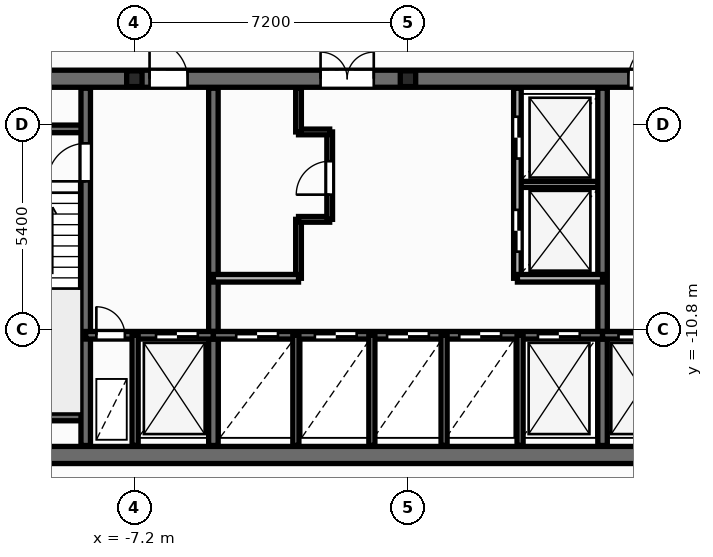
"""IFC4 building model, lengths in metres.
Left out: names, types, materials, properties, quantities, classifications, styles, units other than length and angle.
Written with IfcOpenShell. Run it as: python <this file> out.ifc"""

import sys

from ifc_helpers import new_model, si_unit, direction, frame, frame_2d, origin, origin_2d, place, context, subcontext, project, spatial, rectangle, i_section, extrude, element, fill, save


model = new_model("IFC4")
c1 = context("Model", 3, precision=1e-05, world=origin(), true_north=direction((0.0, 1.0)))
c2 = subcontext(c1, "Body", "Model", "MODEL_VIEW")
j1 = project(units=[si_unit("LENGTHUNIT", "METRE"), si_unit("PLANEANGLEUNIT", "RADIAN")], contexts=[c1])
p1 = place(None, origin())
s1 = spatial("IfcSite", under=j1, at=p1, CompositionType="ELEMENT")
p2 = place(p1, origin())
s2 = spatial("IfcBuilding", under=s1, at=p2, CompositionType="ELEMENT")
p3 = place(p2, frame((0.0, 0.0, 143.7)))
s3 = spatial("IfcBuildingStorey", under=s2, at=p3, CompositionType="ELEMENT", Elevation=143.7)
for number, where, z_axis, x_axis in (
    (1, (-7.2, -4.2, 0.0), (0.0, 0.0, 1.0), (1.0, 0.0, 0.0)),
    (2, (0.0, -4.2, 0.0), (0.0, 0.0, 1.0), (1.0, 0.0, 0.0)),
):
    element("IfcColumn", number, at=place(p3, frame(where, z_axis=z_axis, x_axis=x_axis)), inside=s3, PredefinedType="PILASTER", context=c2, shape_type="SweptSolid", body=[
        extrude(i_section(OverallWidth=0.405, OverallDepth=0.414, WebThickness=0.022, FlangeThickness=0.032, at=origin_2d()), origin(), (0.0, 0.0, 1.0), 3.6),
    ])
p4 = place(p3, frame((-2.88, -9.45, 0.0), z_axis=(0.0, 0.0, 1.0), x_axis=(0.0, 1.0, 0.0)))
e3 = element("IfcWall", 3, at=p4, inside=s3, PredefinedType="PARTITIONING", context=c2, shape_type="SweptSolid", body=[
    extrude(rectangle(XDim=1.55, YDim=0.15, at=frame_2d((0.775, 0.0))), origin(), (0.0, 0.0, 1.0), 3.35),
])
p5 = place(p3, frame((-2.88, -7.9, 0.0), z_axis=(0.0, 0.0, 1.0), x_axis=(1.0, 0.0, 0.0)))
e4 = element("IfcWall", 4, at=p5, inside=s3, PredefinedType="PARTITIONING", context=c2, shape_type="SweptSolid", body=[
    extrude(rectangle(XDim=0.82, YDim=0.15, at=frame_2d((0.41, 0.0))), origin(), (0.0, 0.0, 1.0), 3.35),
])
p6 = place(p3, frame((-2.06, -7.9, 0.0), z_axis=(0.0, 0.0, 1.0), x_axis=(0.0, 1.0, 0.0)))
e5 = element("IfcWall", 5, at=p6, inside=s3, PredefinedType="PARTITIONING", context=c2, shape_type="SweptSolid", body=[
    extrude(rectangle(XDim=2.3, YDim=0.15, at=frame_2d((1.15, 0.0))), origin(), (0.0, 0.0, 1.0), 3.35),
])
p7 = place(p6, frame((0.65, 0.0, 0.0)))
e6 = element("IfcOpeningElement", 6, at=p7, cuts=e5, PredefinedType="OPENING", context=c2, shape_type="SweptSolid", body=[
    extrude(rectangle(XDim=0.886, YDim=2.104, at=frame_2d((0.44, 1.052))), frame((0.0, 0.085, 0.0), z_axis=(0.0, -1.0, 0.0), x_axis=(1.0, 0.0, 0.0)), (0.0, 0.0, 1.0), 0.17),
])
p8 = place(p3, frame((-2.88, -5.6, 0.0), z_axis=(0.0, 0.0, 1.0), x_axis=(1.0, 0.0, 0.0)))
e7 = element("IfcWall", 7, at=p8, inside=s3, PredefinedType="PARTITIONING", context=c2, shape_type="SweptSolid", body=[
    extrude(rectangle(XDim=0.82, YDim=0.15, at=frame_2d((0.41, 0.0))), origin(), (0.0, 0.0, 1.0), 3.35),
])
p9 = place(p3, frame((-2.88, -5.6, 0.0), z_axis=(0.0, 0.0, 1.0), x_axis=(0.0, 1.0, 0.0)))
e8 = element("IfcWall", 8, at=p9, inside=s3, PredefinedType="PARTITIONING", context=c2, shape_type="SweptSolid", body=[
    extrude(rectangle(XDim=1.15, YDim=0.15, at=frame_2d((0.575, 0.0))), origin(), (0.0, 0.0, 1.0), 3.35),
])
p10 = place(p3, frame((2.88, -6.98, 0.0), z_axis=(0.0, 0.0, 1.0), x_axis=(1.0, 0.0, 0.0)))
e9 = element("IfcWall", 9, at=p10, inside=s3, PredefinedType="PARTITIONING", context=c2, shape_type="SweptSolid", body=[
    extrude(rectangle(XDim=2.24, YDim=0.16, at=frame_2d((1.12, 0.0))), origin(), (0.0, 0.0, 1.0), 3.35),
])
p11 = place(p3, frame((-12.65, -14.1, 0.0), z_axis=(0.0, 0.0, 1.0), x_axis=(1.0, 0.0, 0.0)))
e10 = element("IfcWall", 10, at=p11, inside=s3, PredefinedType="SHEAR", context=c2, shape_type="SweptSolid", body=[
    extrude(rectangle(XDim=25.3, YDim=0.45, at=frame_2d((12.65, 0.0))), origin(), (0.0, 0.0, 1.0), 3.6),
])
p12 = place(p3, frame((-12.65, -4.2, 0.0), z_axis=(0.0, 0.0, 1.0), x_axis=(1.0, 0.0, 0.0)))
e11 = element("IfcWall", 11, at=p12, inside=s3, PredefinedType="SHEAR", context=c2, shape_type="SweptSolid", body=[
    extrude(rectangle(XDim=25.3, YDim=0.45, at=frame_2d((12.65, 0.0))), origin(), (0.0, 0.0, 1.0), 3.6),
])
p13 = place(p12, frame((1.85, 0.0, 0.0)))
e12 = element("IfcOpeningElement", 12, at=p13, cuts=e11, PredefinedType="OPENING", context=c2, shape_type="SweptSolid", body=[
    extrude(rectangle(XDim=0.756, YDim=2.054, at=frame_2d((0.375, 1.027))), frame((0.0, 0.235, 0.0), z_axis=(0.0, -1.0, 0.0), x_axis=(1.0, 0.0, 0.0)), (0.0, 0.0, 1.0), 0.47),
])
p14 = place(p12, frame((21.85, 0.0, 0.0)))
e13 = element("IfcOpeningElement", 13, at=p14, cuts=e11, PredefinedType="OPENING", context=c2, shape_type="SweptSolid", body=[
    extrude(rectangle(XDim=0.756, YDim=2.054, at=frame_2d((0.375, 1.027))), frame((0.0, 0.235, 0.0), z_axis=(0.0, -1.0, 0.0), x_axis=(1.0, 0.0, 0.0)), (0.0, 0.0, 1.0), 0.47),
])
p15 = place(p12, frame((23.5, 0.0, 0.0)))
e14 = element("IfcOpeningElement", 14, at=p15, cuts=e11, PredefinedType="OPENING", context=c2, shape_type="SweptSolid", body=[
    extrude(rectangle(XDim=0.756, YDim=2.054, at=frame_2d((0.375, 1.027))), frame((0.0, 0.235, 0.0), z_axis=(0.0, -1.0, 0.0), x_axis=(1.0, 0.0, 0.0)), (0.0, 0.0, 1.0), 0.47),
])
p16 = place(p12, frame((5.85, 0.0, 0.0)))
e15 = element("IfcOpeningElement", 15, at=p16, cuts=e11, PredefinedType="OPENING", context=c2, shape_type="SweptSolid", body=[
    extrude(rectangle(XDim=1.006, YDim=2.104, at=frame_2d((0.5, 1.052))), frame((0.0, 0.235, 0.0), z_axis=(0.0, -1.0, 0.0), x_axis=(1.0, 0.0, 0.0)), (0.0, 0.0, 1.0), 0.47),
])
p17 = place(p12, frame((10.35, 0.0, 0.0)))
e16 = element("IfcOpeningElement", 16, at=p17, cuts=e11, PredefinedType="OPENING", context=c2, shape_type="SweptSolid", body=[
    extrude(rectangle(XDim=1.406, YDim=2.154, at=frame_2d((0.7, 1.077))), frame((0.0, 0.235, 0.0), z_axis=(0.0, -1.0, 0.0), x_axis=(1.0, 0.0, 0.0)), (0.0, 0.0, 1.0), 0.47),
])
p18 = place(p12, frame((18.45, 0.0, 0.0)))
e17 = element("IfcOpeningElement", 17, at=p18, cuts=e11, PredefinedType="OPENING", context=c2, shape_type="SweptSolid", body=[
    extrude(rectangle(XDim=1.006, YDim=2.104, at=frame_2d((0.5, 1.052))), frame((0.0, 0.235, 0.0), z_axis=(0.0, -1.0, 0.0), x_axis=(1.0, 0.0, 0.0)), (0.0, 0.0, 1.0), 0.47),
])
for number, where, z_axis, x_axis in (
    (18, (-12.35, -5.52, 0.0), (0.0, 0.0, 1.0), (1.0, 0.0, 0.0)),
    (19, (-12.35, -13.1, 0.0), (0.0, 0.0, 1.0), (1.0, 0.0, 0.0)),
):
    element("IfcWall", number, at=place(p3, frame(where, z_axis=z_axis, x_axis=x_axis)), inside=s3, PredefinedType="SOLIDWALL", context=c2, shape_type="SweptSolid", body=[
        extrude(rectangle(XDim=3.87, YDim=0.2, at=frame_2d((1.935, 0.0))), origin(), (0.0, 0.0, 1.0), 3.6),
    ])
p19 = place(p3, frame((-8.48, -13.85, 0.0), z_axis=(0.0, 0.0, 1.0), x_axis=(0.0, 1.0, 0.0)))
e20 = element("IfcWall", 20, at=p19, inside=s3, PredefinedType="SHEAR", context=c2, shape_type="SweptSolid", body=[
    extrude(rectangle(XDim=9.4, YDim=0.25, at=frame_2d((4.7, 0.0))), origin(), (0.0, 0.0, 1.0), 3.6),
])
p20 = place(p19, frame((6.95, 0.0, 0.0)))
e21 = element("IfcOpeningElement", 21, at=p20, cuts=e20, PredefinedType="OPENING", context=c2, shape_type="SweptSolid", body=[
    extrude(rectangle(XDim=1.006, YDim=2.104, at=frame_2d((0.5, 1.052))), frame((0.0, 0.135, 0.0), z_axis=(0.0, -1.0, 0.0), x_axis=(1.0, 0.0, 0.0)), (0.0, 0.0, 1.0), 0.27),
])
for number, where, z_axis, x_axis in (
    (22, (-5.12, -13.85, 0.0), (0.0, 0.0, 1.0), (0.0, 1.0, 0.0)),
    (23, (5.12, -13.85, 0.0), (0.0, 0.0, 1.0), (0.0, 1.0, 0.0)),
):
    element("IfcWall", number, at=place(p3, frame(where, z_axis=z_axis, x_axis=x_axis)), inside=s3, PredefinedType="SHEAR", context=c2, shape_type="SweptSolid", body=[
        extrude(rectangle(XDim=9.4, YDim=0.25, at=frame_2d((4.7, 0.0))), origin(), (0.0, 0.0, 1.0), 3.6),
    ])
p21 = place(p3, frame((-8.48, -10.95, 0.0), z_axis=(0.0, 0.0, 1.0), x_axis=(1.0, 0.0, 0.0)))
e24 = element("IfcWall", 24, at=p21, inside=s3, PredefinedType="SOLIDWALL", context=c2, shape_type="SweptSolid", body=[
    extrude(rectangle(XDim=3.36, YDim=0.2, at=frame_2d((1.68, 0.0))), origin(), (0.0, 0.0, 1.0), 3.6),
])
p22 = place(p21, frame((0.28, 0.0, 0.0)))
e25 = element("IfcOpeningElement", 25, at=p22, cuts=e24, PredefinedType="OPENING", context=c2, shape_type="SweptSolid", body=[
    extrude(rectangle(XDim=0.756, YDim=2.054, at=frame_2d((0.375, 1.027))), frame((0.0, 0.11, 0.0), z_axis=(0.0, -1.0, 0.0), x_axis=(1.0, 0.0, 0.0)), (0.0, 0.0, 1.0), 0.22),
])
p23 = place(p21, frame((1.85, 0.0, 0.0)))
e26 = element("IfcOpeningElement", 26, at=p23, cuts=e24, PredefinedType="OPENING", context=c2, shape_type="SweptSolid", body=[
    extrude(rectangle(XDim=1.106, YDim=2.104, at=frame_2d((0.55, 1.052))), frame((0.0, 0.11, 0.0), z_axis=(0.0, -1.0, 0.0), x_axis=(1.0, 0.0, 0.0)), (0.0, 0.0, 1.0), 0.22),
])
p24 = place(p3, frame((-5.12, -10.95, 0.0), z_axis=(0.0, 0.0, 1.0), x_axis=(1.0, 0.0, 0.0)))
e27 = element("IfcWall", 27, at=p24, inside=s3, PredefinedType="SOLIDWALL", context=c2, shape_type="SweptSolid", body=[
    extrude(rectangle(XDim=10.24, YDim=0.2, at=frame_2d((5.12, 0.0))), origin(), (0.0, 0.0, 1.0), 3.6),
])
p25 = place(p24, frame((0.6, 0.0, 0.0)))
e28 = element("IfcOpeningElement", 28, at=p25, cuts=e27, PredefinedType="OPENING", context=c2, shape_type="SweptSolid", body=[
    extrude(rectangle(XDim=1.106, YDim=2.104, at=frame_2d((0.55, 1.052))), frame((0.0, 0.11, 0.0), z_axis=(0.0, -1.0, 0.0), x_axis=(1.0, 0.0, 0.0)), (0.0, 0.0, 1.0), 0.22),
])
p26 = place(p24, frame((2.67, 0.0, 0.0)))
e29 = element("IfcOpeningElement", 29, at=p26, cuts=e27, PredefinedType="OPENING", context=c2, shape_type="SweptSolid", body=[
    extrude(rectangle(XDim=1.106, YDim=2.104, at=frame_2d((0.55, 1.052))), frame((0.0, 0.11, 0.0), z_axis=(0.0, -1.0, 0.0), x_axis=(1.0, 0.0, 0.0)), (0.0, 0.0, 1.0), 0.22),
])
p27 = place(p24, frame((4.57, 0.0, 0.0)))
e30 = element("IfcOpeningElement", 30, at=p27, cuts=e27, PredefinedType="OPENING", context=c2, shape_type="SweptSolid", body=[
    extrude(rectangle(XDim=1.106, YDim=2.104, at=frame_2d((0.55, 1.052))), frame((0.0, 0.11, 0.0), z_axis=(0.0, -1.0, 0.0), x_axis=(1.0, 0.0, 0.0)), (0.0, 0.0, 1.0), 0.22),
])
p28 = place(p24, frame((6.47, 0.0, 0.0)))
e31 = element("IfcOpeningElement", 31, at=p28, cuts=e27, PredefinedType="OPENING", context=c2, shape_type="SweptSolid", body=[
    extrude(rectangle(XDim=1.106, YDim=2.104, at=frame_2d((0.55, 1.052))), frame((0.0, 0.11, 0.0), z_axis=(0.0, -1.0, 0.0), x_axis=(1.0, 0.0, 0.0)), (0.0, 0.0, 1.0), 0.22),
])
p29 = place(p24, frame((8.54, 0.0, 0.0)))
e32 = element("IfcOpeningElement", 32, at=p29, cuts=e27, PredefinedType="OPENING", context=c2, shape_type="SweptSolid", body=[
    extrude(rectangle(XDim=1.106, YDim=2.104, at=frame_2d((0.55, 1.052))), frame((0.0, 0.11, 0.0), z_axis=(0.0, -1.0, 0.0), x_axis=(1.0, 0.0, 0.0)), (0.0, 0.0, 1.0), 0.22),
])
p30 = place(p3, frame((5.12, -10.95, 0.0), z_axis=(0.0, 0.0, 1.0), x_axis=(1.0, 0.0, 0.0)))
e33 = element("IfcWall", 33, at=p30, inside=s3, PredefinedType="SOLIDWALL", context=c2, shape_type="SweptSolid", body=[
    extrude(rectangle(XDim=3.36, YDim=0.2, at=frame_2d((1.68, 0.0))), origin(), (0.0, 0.0, 1.0), 3.6),
])
p31 = place(p30, frame((0.42, 0.0, 0.0)))
e34 = element("IfcOpeningElement", 34, at=p31, cuts=e33, PredefinedType="OPENING", context=c2, shape_type="SweptSolid", body=[
    extrude(rectangle(XDim=1.106, YDim=2.104, at=frame_2d((0.55, 1.052))), frame((0.0, 0.11, 0.0), z_axis=(0.0, -1.0, 0.0), x_axis=(1.0, 0.0, 0.0)), (0.0, 0.0, 1.0), 0.22),
])
p32 = place(p30, frame((2.3, 0.0, 0.0)))
e35 = element("IfcOpeningElement", 35, at=p32, cuts=e33, PredefinedType="OPENING", context=c2, shape_type="SweptSolid", body=[
    extrude(rectangle(XDim=0.756, YDim=2.054, at=frame_2d((0.375, 1.027))), frame((0.0, 0.11, 0.0), z_axis=(0.0, -1.0, 0.0), x_axis=(1.0, 0.0, 0.0)), (0.0, 0.0, 1.0), 0.22),
])
for number, where, z_axis, x_axis in (
    (36, (-7.18, -13.85, 0.0), (0.0, 0.0, 1.0), (0.0, 1.0, 0.0)),
    (37, (-2.95, -13.85, 0.0), (0.0, 0.0, 1.0), (0.0, 1.0, 0.0)),
    (38, (2.95, -13.85, 0.0), (0.0, 0.0, 1.0), (0.0, 1.0, 0.0)),
):
    element("IfcWall", number, at=place(p3, frame(where, z_axis=z_axis, x_axis=x_axis)), inside=s3, PredefinedType="PARTITIONING", context=c2, shape_type="SweptSolid", body=[
        extrude(rectangle(XDim=2.9, YDim=0.16, at=frame_2d((1.45, 0.0))), origin(), (0.0, 0.0, 1.0), 2.475),
    ])
p33 = place(p3, frame((-5.12, -9.45, 0.0), z_axis=(0.0, 0.0, 1.0), x_axis=(1.0, 0.0, 0.0)))
e39 = element("IfcWall", 39, at=p33, inside=s3, PredefinedType="SOLIDWALL", context=c2, shape_type="SweptSolid", body=[
    extrude(rectangle(XDim=2.24, YDim=0.2, at=frame_2d((1.12, 0.0))), origin(), (0.0, 0.0, 1.0), 3.35),
])
p34 = place(p3, frame((2.88, -9.45, 0.0), z_axis=(0.0, 0.0, 1.0), x_axis=(0.0, 1.0, 0.0)))
e40 = element("IfcWall", 40, at=p34, inside=s3, PredefinedType="SOLIDWALL", context=c2, shape_type="SweptSolid", body=[
    extrude(rectangle(XDim=5.0, YDim=0.2, at=frame_2d((2.5, 0.0))), origin(), (0.0, 0.0, 1.0), 3.35),
])
p35 = place(p34, frame((0.7, 0.0, 0.0)))
e41 = element("IfcOpeningElement", 41, at=p35, cuts=e40, PredefinedType="OPENING", context=c2, shape_type="SweptSolid", body=[
    extrude(rectangle(XDim=1.106, YDim=2.104, at=frame_2d((0.55, 1.052))), frame((0.0, 0.11, 0.0), z_axis=(0.0, -1.0, 0.0), x_axis=(1.0, 0.0, 0.0)), (0.0, 0.0, 1.0), 0.22),
])
p36 = place(p34, frame((3.15, 0.0, 0.0)))
e42 = element("IfcOpeningElement", 42, at=p36, cuts=e40, PredefinedType="OPENING", context=c2, shape_type="SweptSolid", body=[
    extrude(rectangle(XDim=1.106, YDim=2.104, at=frame_2d((0.55, 1.052))), frame((0.0, 0.11, 0.0), z_axis=(0.0, -1.0, 0.0), x_axis=(1.0, 0.0, 0.0)), (0.0, 0.0, 1.0), 0.22),
])
p37 = place(p3, frame((2.88, -9.45, 0.0), z_axis=(0.0, 0.0, 1.0), x_axis=(1.0, 0.0, 0.0)))
e43 = element("IfcWall", 43, at=p37, inside=s3, PredefinedType="SOLIDWALL", context=c2, shape_type="SweptSolid", body=[
    extrude(rectangle(XDim=2.24, YDim=0.2, at=frame_2d((1.12, 0.0))), origin(), (0.0, 0.0, 1.0), 3.35),
])
for number, where, z_axis, x_axis in (
    (44, (-0.95, -13.85, 0.0), (0.0, 0.0, 1.0), (0.0, 1.0, 0.0)),
    (45, (0.95, -13.85, 0.0), (0.0, 0.0, 1.0), (0.0, 1.0, 0.0)),
):
    element("IfcWall", number, at=place(p3, frame(where, z_axis=z_axis, x_axis=x_axis)), inside=s3, PredefinedType="PARTITIONING", context=c2, shape_type="SweptSolid", body=[
        extrude(rectangle(XDim=2.9, YDim=0.16, at=frame_2d((1.45, 0.0))), origin(), (0.0, 0.0, 1.0), 2.475),
    ])
p38 = place(p7, origin())
e46 = element("IfcDoor", 46, at=p38, inside=s3, OperationType="SINGLE_SWING_LEFT", PredefinedType="DOOR", context=c2, shape_type="SweptSolid", body=[
    extrude(rectangle(XDim=0.88, YDim=2.1, at=frame_2d((0.44, 1.05))), frame((0.0, 0.025, 0.0), z_axis=(0.0, -1.0, 0.0), x_axis=(1.0, 0.0, 0.0)), (0.0, 0.0, 1.0), 0.05),
])
fill(e6, e46)
p39 = place(p35, origin())
e47 = element("IfcDoor", 47, at=p39, inside=s3, OperationType="DOUBLE_DOOR_SLIDING", PredefinedType="DOOR", context=c2, shape_type="SweptSolid", body=[
    extrude(rectangle(XDim=1.1, YDim=2.1, at=frame_2d((0.55, 1.05))), frame((0.0, 0.025, 0.0), z_axis=(0.0, -1.0, 0.0), x_axis=(1.0, 0.0, 0.0)), (0.0, 0.0, 1.0), 0.05),
])
fill(e41, e47)
p40 = place(p36, origin())
e48 = element("IfcDoor", 48, at=p40, inside=s3, OperationType="DOUBLE_DOOR_SLIDING", PredefinedType="DOOR", context=c2, shape_type="SweptSolid", body=[
    extrude(rectangle(XDim=1.1, YDim=2.1, at=frame_2d((0.55, 1.05))), frame((0.0, 0.025, 0.0), z_axis=(0.0, -1.0, 0.0), x_axis=(1.0, 0.0, 0.0)), (0.0, 0.0, 1.0), 0.05),
])
fill(e42, e48)
p41 = place(p20, origin())
e49 = element("IfcDoor", 49, at=p41, inside=s3, OperationType="SINGLE_SWING_LEFT", PredefinedType="DOOR", context=c2, shape_type="SweptSolid", body=[
    extrude(rectangle(XDim=1.0, YDim=2.1, at=frame_2d((0.5, 1.05))), frame((0.0, 0.025, 0.0), z_axis=(0.0, -1.0, 0.0), x_axis=(1.0, 0.0, 0.0)), (0.0, 0.0, 1.0), 0.05),
])
fill(e21, e49)
p42 = place(p22, origin())
e50 = element("IfcDoor", 50, at=p42, inside=s3, OperationType="SINGLE_SWING_LEFT", PredefinedType="DOOR", context=c2, shape_type="SweptSolid", body=[
    extrude(rectangle(XDim=0.75, YDim=2.05, at=frame_2d((0.375, 1.025))), frame((0.0, 0.025, 0.0), z_axis=(0.0, -1.0, 0.0), x_axis=(1.0, 0.0, 0.0)), (0.0, 0.0, 1.0), 0.05),
])
fill(e25, e50)
p43 = place(p23, origin())
e51 = element("IfcDoor", 51, at=p43, inside=s3, OperationType="DOUBLE_DOOR_SLIDING", PredefinedType="DOOR", context=c2, shape_type="SweptSolid", body=[
    extrude(rectangle(XDim=1.1, YDim=2.1, at=frame_2d((0.55, 1.05))), frame((0.0, 0.025, 0.0), z_axis=(0.0, -1.0, 0.0), x_axis=(1.0, 0.0, 0.0)), (0.0, 0.0, 1.0), 0.05),
])
fill(e26, e51)
p44 = place(p31, origin())
e52 = element("IfcDoor", 52, at=p44, inside=s3, OperationType="DOUBLE_DOOR_SLIDING", PredefinedType="DOOR", context=c2, shape_type="SweptSolid", body=[
    extrude(rectangle(XDim=1.1, YDim=2.1, at=frame_2d((0.55, 1.05))), frame((0.0, 0.025, 0.0), z_axis=(0.0, -1.0, 0.0), x_axis=(1.0, 0.0, 0.0)), (0.0, 0.0, 1.0), 0.05),
])
fill(e34, e52)
p45 = place(p25, origin())
e53 = element("IfcDoor", 53, at=p45, inside=s3, OperationType="DOUBLE_DOOR_SLIDING", PredefinedType="DOOR", context=c2, shape_type="SweptSolid", body=[
    extrude(rectangle(XDim=1.1, YDim=2.1, at=frame_2d((0.55, 1.05))), frame((0.0, 0.025, 0.0), z_axis=(0.0, -1.0, 0.0), x_axis=(1.0, 0.0, 0.0)), (0.0, 0.0, 1.0), 0.05),
])
fill(e28, e53)
p46 = place(p26, origin())
e54 = element("IfcDoor", 54, at=p46, inside=s3, OperationType="DOUBLE_DOOR_SLIDING", PredefinedType="DOOR", context=c2, shape_type="SweptSolid", body=[
    extrude(rectangle(XDim=1.1, YDim=2.1, at=frame_2d((0.55, 1.05))), frame((0.0, 0.025, 0.0), z_axis=(0.0, -1.0, 0.0), x_axis=(1.0, 0.0, 0.0)), (0.0, 0.0, 1.0), 0.05),
])
fill(e29, e54)
p47 = place(p27, origin())
e55 = element("IfcDoor", 55, at=p47, inside=s3, OperationType="DOUBLE_DOOR_SLIDING", PredefinedType="DOOR", context=c2, shape_type="SweptSolid", body=[
    extrude(rectangle(XDim=1.1, YDim=2.1, at=frame_2d((0.55, 1.05))), frame((0.0, 0.025, 0.0), z_axis=(0.0, -1.0, 0.0), x_axis=(1.0, 0.0, 0.0)), (0.0, 0.0, 1.0), 0.05),
])
fill(e30, e55)
p48 = place(p28, origin())
e56 = element("IfcDoor", 56, at=p48, inside=s3, OperationType="DOUBLE_DOOR_SLIDING", PredefinedType="DOOR", context=c2, shape_type="SweptSolid", body=[
    extrude(rectangle(XDim=1.1, YDim=2.1, at=frame_2d((0.55, 1.05))), frame((0.0, 0.025, 0.0), z_axis=(0.0, -1.0, 0.0), x_axis=(1.0, 0.0, 0.0)), (0.0, 0.0, 1.0), 0.05),
])
fill(e31, e56)
p49 = place(p29, origin())
e57 = element("IfcDoor", 57, at=p49, inside=s3, OperationType="DOUBLE_DOOR_SLIDING", PredefinedType="DOOR", context=c2, shape_type="SweptSolid", body=[
    extrude(rectangle(XDim=1.1, YDim=2.1, at=frame_2d((0.55, 1.05))), frame((0.0, 0.025, 0.0), z_axis=(0.0, -1.0, 0.0), x_axis=(1.0, 0.0, 0.0)), (0.0, 0.0, 1.0), 0.05),
])
fill(e32, e57)
p50 = place(p16, origin())
e58 = element("IfcDoor", 58, at=p50, inside=s3, OperationType="SINGLE_SWING_LEFT", PredefinedType="DOOR", context=c2, shape_type="SweptSolid", body=[
    extrude(rectangle(XDim=1.0, YDim=2.1, at=frame_2d((0.5, 1.05))), frame((0.0, 0.025, 0.0), z_axis=(0.0, -1.0, 0.0), x_axis=(1.0, 0.0, 0.0)), (0.0, 0.0, 1.0), 0.05),
])
fill(e15, e58)
p51 = place(p17, origin())
e59 = element("IfcDoor", 59, at=p51, inside=s3, OperationType="DOUBLE_DOOR_SINGLE_SWING", PredefinedType="DOOR", context=c2, shape_type="SweptSolid", body=[
    extrude(rectangle(XDim=1.4, YDim=2.15, at=frame_2d((0.7, 1.075))), frame((0.0, 0.025, 0.0), z_axis=(0.0, -1.0, 0.0), x_axis=(1.0, 0.0, 0.0)), (0.0, 0.0, 1.0), 0.05),
])
fill(e16, e59)
p52 = place(p18, origin())
e60 = element("IfcDoor", 60, at=p52, inside=s3, OperationType="SINGLE_SWING_RIGHT", PredefinedType="DOOR", context=c2, shape_type="SweptSolid", body=[
    extrude(rectangle(XDim=1.0, YDim=2.1, at=frame_2d((0.5, 1.05))), frame((0.0, 0.025, 0.0), z_axis=(0.0, -1.0, 0.0), x_axis=(1.0, 0.0, 0.0)), (0.0, 0.0, 1.0), 0.05),
])
fill(e17, e60)
save(model, sys.argv[1])
